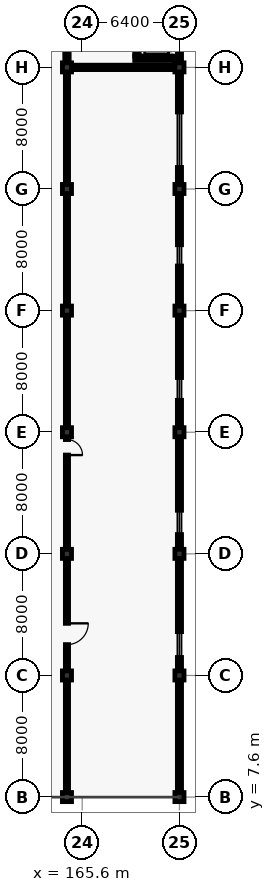
"""IFC4 building model, lengths in metres.
Left out: names, types, materials, properties, quantities, classifications, styles, units other than length and angle.
Written with IfcOpenShell. Run it as: python <this file> out.ifc"""

import sys

from ifc_helpers import new_model, si_unit, direction, frame, frame_2d, origin, origin_2d, place, context, subcontext, project, spatial, rectangle, extrude, element, fill, save


model = new_model("IFC4")
c1 = context("Model", 3, precision=1e-05, world=origin(), true_north=direction((0.0, 1.0)))
c2 = subcontext(c1, "Body", "Model", "MODEL_VIEW")
j1 = project(units=[si_unit("LENGTHUNIT", "METRE"), si_unit("PLANEANGLEUNIT", "RADIAN")], contexts=[c1])
p1 = place(None, origin())
s1 = spatial("IfcSite", under=j1, at=p1, CompositionType="ELEMENT")
p2 = place(p1, origin())
s2 = spatial("IfcBuilding", under=s1, at=p2, CompositionType="ELEMENT")
p3 = place(p2, frame((0.0, 0.0, 10.2)))
s3 = spatial("IfcBuildingStorey", under=s2, at=p3, CompositionType="ELEMENT", Elevation=10.2)
for number, where, z_axis, x_axis in (
    (1, (164.6, 7.6, 0.0), (0.0, 0.0, 1.0), (1.0, 0.0, 0.0)),
    (2, (164.6, 15.6, 0.0), (0.0, 0.0, 1.0), (1.0, 0.0, 0.0)),
    (3, (164.6, 23.6, 0.0), (0.0, 0.0, 1.0), (1.0, 0.0, 0.0)),
    (4, (164.6, 31.6, 0.0), (0.0, 0.0, 1.0), (1.0, 0.0, 0.0)),
    (5, (164.6, 39.6, 0.0), (0.0, 0.0, 1.0), (1.0, 0.0, 0.0)),
    (6, (164.6, 47.6, 0.0), (0.0, 0.0, 1.0), (1.0, 0.0, 0.0)),
    (7, (164.6, 55.6, 0.0), (0.0, 0.0, 1.0), (1.0, 0.0, 0.0)),
    (8, (172.0, 7.6, 0.0), (0.0, 0.0, 1.0), (1.0, 0.0, 0.0)),
    (9, (172.0, 15.6, 0.0), (0.0, 0.0, 1.0), (1.0, 0.0, 0.0)),
    (10, (172.0, 23.6, 0.0), (0.0, 0.0, 1.0), (1.0, 0.0, 0.0)),
    (11, (172.0, 31.6, 0.0), (0.0, 0.0, 1.0), (1.0, 0.0, 0.0)),
    (12, (172.0, 39.6, 0.0), (0.0, 0.0, 1.0), (1.0, 0.0, 0.0)),
    (13, (172.0, 47.6, 0.0), (0.0, 0.0, 1.0), (1.0, 0.0, 0.0)),
    (14, (172.0, 55.6, 0.0), (0.0, 0.0, 1.0), (1.0, 0.0, 0.0)),
):
    element("IfcColumn", number, at=place(p3, frame(where, z_axis=z_axis, x_axis=x_axis)), inside=s3, PredefinedType="COLUMN", context=c2, shape_type="SweptSolid", body=[
        extrude(rectangle(XDim=0.6, YDim=0.6, at=origin_2d()), origin(), (0.0, 0.0, 1.0), 5.4),
    ])
p4 = place(p3, frame((172.0, 63.6, 0.0), z_axis=(0.0, 0.0, 1.0), x_axis=(0.0, -1.0, 0.0)))
e15 = element("IfcWall", 15, at=p4, inside=s3, PredefinedType="SOLIDWALL", context=c2, shape_type="SweptSolid", body=[
    extrude(rectangle(XDim=56.0, YDim=0.275, at=frame_2d((28.0, 0.0))), origin(), (0.0, 0.0, 1.0), 4.3),
])
p5 = place(p4, frame((10.933, 0.0, 0.8)))
e16 = element("IfcOpeningElement", 16, at=p5, cuts=e15, PredefinedType="OPENING", context=c2, shape_type="SweptSolid", body=[
    extrude(rectangle(XDim=3.65, YDim=2.9, at=frame_2d((1.825, 1.45))), frame((0.0, 0.147, 0.0), z_axis=(0.0, -1.0, 0.0), x_axis=(1.0, 0.0, 0.0)), (0.0, 0.0, 1.0), 0.295),
])
p6 = place(p4, frame((19.667, 0.0, 0.8)))
e17 = element("IfcOpeningElement", 17, at=p6, cuts=e15, PredefinedType="OPENING", context=c2, shape_type="SweptSolid", body=[
    extrude(rectangle(XDim=1.4, YDim=2.1, at=frame_2d((0.7, 1.05))), frame((0.0, 0.147, 0.0), z_axis=(0.0, -1.0, 0.0), x_axis=(1.0, 0.0, 0.0)), (0.0, 0.0, 1.0), 0.295),
])
p7 = place(p4, frame((28.4, 0.0, 0.8)))
e18 = element("IfcOpeningElement", 18, at=p7, cuts=e15, PredefinedType="OPENING", context=c2, shape_type="SweptSolid", body=[
    extrude(rectangle(XDim=1.5, YDim=2.1, at=frame_2d((0.75, 1.05))), frame((0.0, 0.147, 0.0), z_axis=(0.0, -1.0, 0.0), x_axis=(1.0, 0.0, 0.0)), (0.0, 0.0, 1.0), 0.295),
])
p8 = place(p4, frame((37.133, 0.0, 0.8)))
e19 = element("IfcOpeningElement", 19, at=p8, cuts=e15, PredefinedType="OPENING", context=c2, shape_type="SweptSolid", body=[
    extrude(rectangle(XDim=1.6, YDim=2.1, at=frame_2d((0.8, 1.05))), frame((0.0, 0.147, 0.0), z_axis=(0.0, -1.0, 0.0), x_axis=(1.0, 0.0, 0.0)), (0.0, 0.0, 1.0), 0.295),
])
p9 = place(p4, frame((45.117, 0.0, 0.8)))
e20 = element("IfcOpeningElement", 20, at=p9, cuts=e15, PredefinedType="OPENING", context=c2, shape_type="SweptSolid", body=[
    extrude(rectangle(XDim=1.7, YDim=2.15, at=frame_2d((0.85, 1.075))), frame((0.0, 0.147, 0.0), z_axis=(0.0, -1.0, 0.0), x_axis=(1.0, 0.0, 0.0)), (0.0, 0.0, 1.0), 0.295),
])
p10 = place(p3, frame((164.902, 55.6, 0.0), z_axis=(0.0, 0.0, 1.0), x_axis=(1.0, 0.0, 0.0)))
e21 = element("IfcWall", 21, at=p10, inside=s3, PredefinedType="SHEAR", context=c2, shape_type="SweptSolid", body=[
    extrude(rectangle(XDim=6.796, YDim=0.29, at=frame_2d((3.398, 0.0))), origin(), (0.0, 0.0, 1.0), 5.15),
])
p11 = place(p3, frame((164.6, 55.902, 0.0), z_axis=(0.0, 0.0, 1.0), x_axis=(0.0, 1.0, 0.0)))
e22 = element("IfcWall", 22, at=p11, inside=s3, PredefinedType="SHEAR", context=c2, shape_type="SweptSolid", body=[
    extrude(rectangle(XDim=7.396, YDim=0.29, at=frame_2d((3.698, 0.0))), origin(), (0.0, 0.0, 1.0), 5.15),
])
p12 = place(p11, frame((5.348, 0.0, 0.0)))
e23 = element("IfcOpeningElement", 23, at=p12, cuts=e22, PredefinedType="OPENING", context=c2, shape_type="SweptSolid", body=[
    extrude(rectangle(XDim=1.1, YDim=2.15, at=frame_2d((0.55, 1.075))), frame((0.0, 0.155, 0.0), z_axis=(0.0, -1.0, 0.0), x_axis=(1.0, 0.0, 0.0)), (0.0, 0.0, 1.0), 0.31),
])
p13 = place(p11, frame((1.323, 0.0, 0.0)))
e24 = element("IfcOpeningElement", 24, at=p13, cuts=e22, PredefinedType="OPENING", context=c2, shape_type="SweptSolid", body=[
    extrude(rectangle(XDim=1.15, YDim=2.2, at=frame_2d((0.575, 1.1))), frame((0.0, 0.155, 0.0), z_axis=(0.0, -1.0, 0.0), x_axis=(1.0, 0.0, 0.0)), (0.0, 0.0, 1.0), 0.31),
])
p14 = place(p3, frame((169.055, 56.2, 0.0), z_axis=(0.0, 0.0, 1.0), x_axis=(1.0, 0.0, 0.0)))
e25 = element("IfcWall", 25, at=p14, inside=s3, PredefinedType="SHEAR", context=c2, shape_type="SweptSolid", body=[
    extrude(rectangle(XDim=2.89, YDim=0.29, at=frame_2d((1.445, 0.0))), origin(), (0.0, 0.0, 1.0), 5.15),
])
p15 = place(p3, frame((169.2, 56.345, 0.0), z_axis=(0.0, 0.0, 1.0), x_axis=(0.0, 1.0, 0.0)))
e26 = element("IfcWall", 26, at=p15, inside=s3, PredefinedType="SHEAR", context=c2, shape_type="SweptSolid", body=[
    extrude(rectangle(XDim=2.41, YDim=0.29, at=frame_2d((1.205, 0.0))), origin(), (0.0, 0.0, 1.0), 5.15),
])
p16 = place(p15, frame((0.705, 0.0, 0.0)))
e27 = element("IfcOpeningElement", 27, at=p16, cuts=e26, PredefinedType="OPENING", context=c2, shape_type="SweptSolid", body=[
    extrude(rectangle(XDim=1.0, YDim=2.15, at=frame_2d((0.5, 1.075))), frame((0.0, 0.155, 0.0), z_axis=(0.0, -1.0, 0.0), x_axis=(1.0, 0.0, 0.0)), (0.0, 0.0, 1.0), 0.31),
])
p17 = place(p3, frame((164.6, 55.298, 0.0), z_axis=(0.0, 0.0, 1.0), x_axis=(0.0, -1.0, 0.0)))
e28 = element("IfcWall", 28, at=p17, inside=s3, PredefinedType="PARTITIONING", context=c2, shape_type="SweptSolid", body=[
    extrude(rectangle(XDim=47.396, YDim=0.21, at=frame_2d((23.698, 0.0))), origin(), (0.0, 0.0, 1.0), 4.3),
])
p18 = place(p17, frame((24.18, 0.0, 0.0)))
e29 = element("IfcOpeningElement", 29, at=p18, cuts=e28, PredefinedType="OPENING", context=c2, shape_type="SweptSolid", body=[
    extrude(rectangle(XDim=1.02, YDim=2.1, at=frame_2d((0.51, 1.05))), frame((0.0, 0.115, 0.0), z_axis=(0.0, -1.0, 0.0), x_axis=(1.0, 0.0, 0.0)), (0.0, 0.0, 1.0), 0.23),
])
p19 = place(p17, frame((36.269, 0.0, 0.0)))
e30 = element("IfcOpeningElement", 30, at=p19, cuts=e28, PredefinedType="OPENING", context=c2, shape_type="SweptSolid", body=[
    extrude(rectangle(XDim=1.4, YDim=2.25, at=frame_2d((0.7, 1.125))), frame((0.0, 0.115, 0.0), z_axis=(0.0, -1.0, 0.0), x_axis=(1.0, 0.0, 0.0)), (0.0, 0.0, 1.0), 0.23),
])
p20 = place(p5, origin())
e31 = element("IfcWindow", 31, at=p20, inside=s3, PartitioningType="SINGLE_PANEL", PredefinedType="WINDOW", context=c2, shape_type="SweptSolid", body=[
    extrude(rectangle(XDim=3.65, YDim=2.9, at=frame_2d((1.825, 1.45))), frame((0.0, 0.03, 0.0), z_axis=(0.0, -1.0, 0.0), x_axis=(1.0, 0.0, 0.0)), (0.0, 0.0, 1.0), 0.06),
])
fill(e16, e31)
p21 = place(p6, origin())
e32 = element("IfcWindow", 32, at=p21, inside=s3, PartitioningType="SINGLE_PANEL", PredefinedType="WINDOW", context=c2, shape_type="SweptSolid", body=[
    extrude(rectangle(XDim=1.4, YDim=2.1, at=frame_2d((0.7, 1.05))), frame((0.0, 0.03, 0.0), z_axis=(0.0, -1.0, 0.0), x_axis=(1.0, 0.0, 0.0)), (0.0, 0.0, 1.0), 0.06),
])
fill(e17, e32)
p22 = place(p7, origin())
e33 = element("IfcWindow", 33, at=p22, inside=s3, PartitioningType="SINGLE_PANEL", PredefinedType="WINDOW", context=c2, shape_type="SweptSolid", body=[
    extrude(rectangle(XDim=1.5, YDim=2.1, at=frame_2d((0.75, 1.05))), frame((0.0, 0.03, 0.0), z_axis=(0.0, -1.0, 0.0), x_axis=(1.0, 0.0, 0.0)), (0.0, 0.0, 1.0), 0.06),
])
fill(e18, e33)
p23 = place(p8, origin())
e34 = element("IfcWindow", 34, at=p23, inside=s3, PartitioningType="SINGLE_PANEL", PredefinedType="WINDOW", context=c2, shape_type="SweptSolid", body=[
    extrude(rectangle(XDim=1.6, YDim=2.1, at=frame_2d((0.8, 1.05))), frame((0.0, 0.03, 0.0), z_axis=(0.0, -1.0, 0.0), x_axis=(1.0, 0.0, 0.0)), (0.0, 0.0, 1.0), 0.06),
])
fill(e19, e34)
p24 = place(p9, origin())
e35 = element("IfcWindow", 35, at=p24, inside=s3, PartitioningType="SINGLE_PANEL", PredefinedType="WINDOW", context=c2, shape_type="SweptSolid", body=[
    extrude(rectangle(XDim=1.7, YDim=2.15, at=frame_2d((0.85, 1.075))), frame((0.0, 0.03, 0.0), z_axis=(0.0, -1.0, 0.0), x_axis=(1.0, 0.0, 0.0)), (0.0, 0.0, 1.0), 0.06),
])
fill(e20, e35)
p25 = place(p18, origin())
e36 = element("IfcDoor", 36, at=p25, inside=s3, OperationType="SINGLE_SWING_RIGHT", PredefinedType="DOOR", context=c2, shape_type="SweptSolid", body=[
    extrude(rectangle(XDim=1.02, YDim=2.1, at=frame_2d((0.51, 1.05))), frame((0.0, 0.025, 0.0), z_axis=(0.0, -1.0, 0.0), x_axis=(1.0, 0.0, 0.0)), (0.0, 0.0, 1.0), 0.05),
])
fill(e29, e36)
p26 = place(p19, origin())
e37 = element("IfcDoor", 37, at=p26, inside=s3, OperationType="SINGLE_SWING_LEFT", PredefinedType="DOOR", context=c2, shape_type="SweptSolid", body=[
    extrude(rectangle(XDim=1.4, YDim=2.25, at=frame_2d((0.7, 1.125))), frame((0.0, 0.025, 0.0), z_axis=(0.0, -1.0, 0.0), x_axis=(1.0, 0.0, 0.0)), (0.0, 0.0, 1.0), 0.05),
])
fill(e30, e37)
save(model, sys.argv[1])
